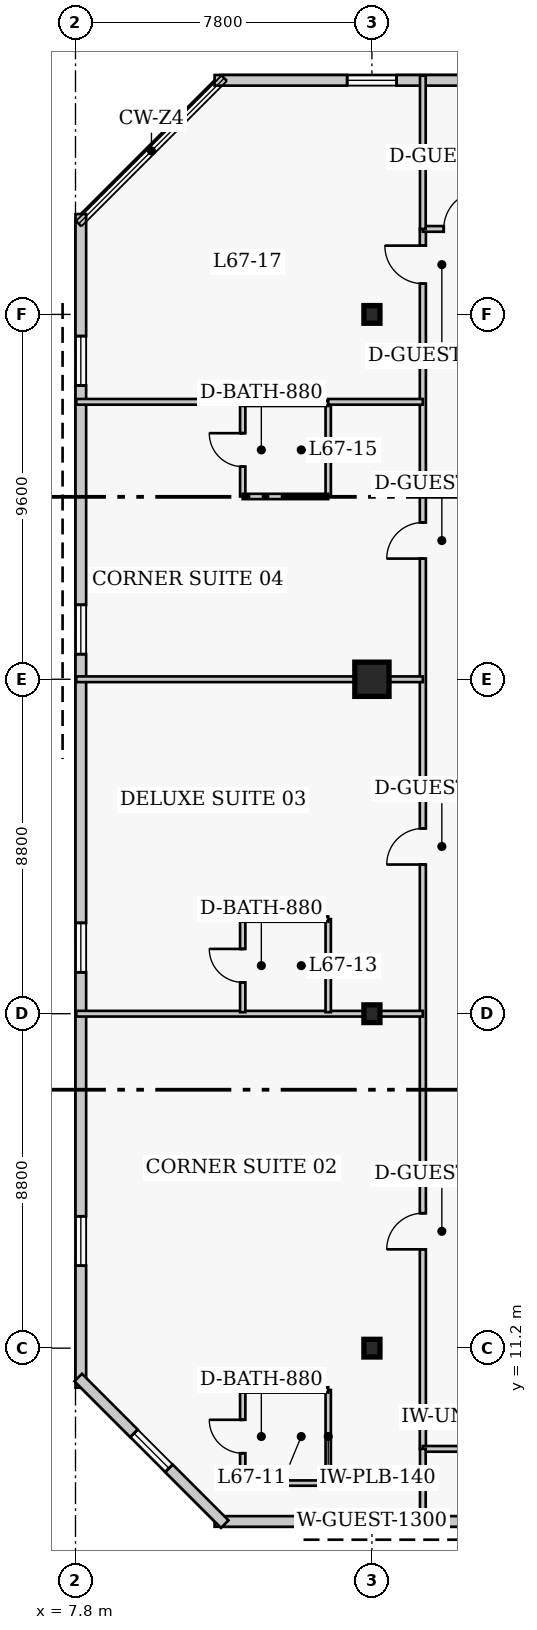
"""IFC4 building model, lengths in metres.
Left out: names, types, materials, properties, quantities, classifications, styles, units other than length and angle.
Written with IfcOpenShell. Run it as: python <this file> out.ifc"""

import sys

from ifc_helpers import new_model, si_unit, direction, frame, frame_2d, origin, origin_2d, place, context, subcontext, project, spatial, rectangle, i_section, extrude, element, fill, save


model = new_model("IFC4")
c1 = context("Model", 3, precision=1e-05, world=origin(), true_north=direction((0.0, 1.0)))
c2 = subcontext(c1, "Body", "Model", "MODEL_VIEW")
j1 = project(units=[si_unit("LENGTHUNIT", "METRE"), si_unit("PLANEANGLEUNIT", "RADIAN")], contexts=[c1])
p1 = place(None, origin())
s1 = spatial("IfcSite", under=j1, at=p1, CompositionType="ELEMENT")
p2 = place(p1, origin())
s2 = spatial("IfcBuilding", under=s1, at=p2, CompositionType="ELEMENT")
p3 = place(p2, frame((0.0, 0.0, 269.4)))
s3 = spatial("IfcBuildingStorey", under=s2, at=p3, CompositionType="ELEMENT", Elevation=269.4)
for number, where, z_axis, x_axis in (
    (1, (15.6, 11.2, 0.0), (0.0, 0.0, 1.0), (1.0, 0.0, 0.0)),
    (2, (15.6, 20.0, 0.0), (0.0, 0.0, 1.0), (1.0, 0.0, 0.0)),
):
    element("IfcColumn", number, at=place(p3, frame(where, z_axis=z_axis, x_axis=x_axis)), inside=s3, PredefinedType="COLUMN", context=c2, shape_type="SweptSolid", body=[
        extrude(i_section(OverallWidth=0.422, OverallDepth=0.465, WebThickness=0.045, FlangeThickness=0.073, FilletRadius=0.017, at=origin_2d()), origin(), (0.0, 0.0, 1.0), 4.0),
    ])
p4 = place(p3, frame((15.6, 28.8, 0.0), z_axis=(0.0, 0.0, 1.0), x_axis=(1.0, 0.0, 0.0)))
e3 = element("IfcColumn", 3, at=p4, inside=s3, PredefinedType="COLUMN", context=c2, shape_type="SweptSolid", body=[
    extrude(rectangle(XDim=0.9, YDim=0.9, at=origin_2d()), origin(), (0.0, 0.0, 1.0), 4.0),
])
p5 = place(p3, frame((15.6, 38.4, 0.0), z_axis=(0.0, 0.0, 1.0), x_axis=(1.0, 0.0, 0.0)))
e4 = element("IfcColumn", 4, at=p5, inside=s3, PredefinedType="COLUMN", context=c2, shape_type="SweptSolid", body=[
    extrude(i_section(OverallWidth=0.422, OverallDepth=0.465, WebThickness=0.045, FlangeThickness=0.073, FilletRadius=0.017, at=origin_2d()), origin(), (0.0, 0.0, 1.0), 4.0),
])
p6 = place(p3, frame((11.46, 6.64, 0.0), z_axis=(0.0, 0.0, 1.0), x_axis=(1.0, 0.0, 0.0)))
e5 = element("IfcWall", 5, at=p6, inside=s3, PredefinedType="SOLIDWALL", context=c2, shape_type="SweptSolid", body=[
    extrude(rectangle(XDim=24.83, YDim=0.28, at=frame_2d((12.415, 0.0))), origin(), (0.0, 0.0, 1.0), 3.76),
])
p7 = place(p6, frame((3.488, 0.0, 0.85)))
e6 = element("IfcOpeningElement", 6, at=p7, cuts=e5, PredefinedType="OPENING", context=c2, shape_type="SweptSolid", body=[
    extrude(rectangle(XDim=1.3, YDim=1.7, at=frame_2d((0.65, 0.85))), frame((0.0, 0.15, 0.0), z_axis=(0.0, -1.0, 0.0), x_axis=(1.0, 0.0, 0.0)), (0.0, 0.0, 1.0), 0.3),
])
p8 = place(p6, frame((12.915, 0.0, 0.85)))
e7 = element("IfcOpeningElement", 7, at=p8, cuts=e5, PredefinedType="OPENING", context=c2, shape_type="SweptSolid", body=[
    extrude(rectangle(XDim=1.3, YDim=1.7, at=frame_2d((0.65, 0.85))), frame((0.0, 0.15, 0.0), z_axis=(0.0, -1.0, 0.0), x_axis=(1.0, 0.0, 0.0)), (0.0, 0.0, 1.0), 0.3),
])
p9 = place(p6, frame((20.692, 0.0, 0.85)))
e8 = element("IfcOpeningElement", 8, at=p9, cuts=e5, PredefinedType="OPENING", context=c2, shape_type="SweptSolid", body=[
    extrude(rectangle(XDim=1.3, YDim=1.7, at=frame_2d((0.65, 0.85))), frame((0.0, 0.15, 0.0), z_axis=(0.0, -1.0, 0.0), x_axis=(1.0, 0.0, 0.0)), (0.0, 0.0, 1.0), 0.3),
])
p10 = place(p3, frame((36.29, 44.56, 0.0), z_axis=(0.0, 0.0, 1.0), x_axis=(-1.0, 0.0, 0.0)))
e9 = element("IfcWall", 9, at=p10, inside=s3, PredefinedType="SOLIDWALL", context=c2, shape_type="SweptSolid", body=[
    extrude(rectangle(XDim=24.83, YDim=0.28, at=frame_2d((12.415, 0.0))), origin(), (0.0, 0.0, 1.0), 3.76),
])
p11 = place(p10, frame((3.488, 0.0, 0.85)))
e10 = element("IfcOpeningElement", 10, at=p11, cuts=e9, PredefinedType="OPENING", context=c2, shape_type="SweptSolid", body=[
    extrude(rectangle(XDim=1.3, YDim=1.7, at=frame_2d((0.65, 0.85))), frame((0.0, 0.15, 0.0), z_axis=(0.0, -1.0, 0.0), x_axis=(1.0, 0.0, 0.0)), (0.0, 0.0, 1.0), 0.3),
])
p12 = place(p10, frame((11.765, 0.0, 0.85)))
e11 = element("IfcOpeningElement", 11, at=p12, cuts=e9, PredefinedType="OPENING", context=c2, shape_type="SweptSolid", body=[
    extrude(rectangle(XDim=1.3, YDim=1.7, at=frame_2d((0.65, 0.85))), frame((0.0, 0.15, 0.0), z_axis=(0.0, -1.0, 0.0), x_axis=(1.0, 0.0, 0.0)), (0.0, 0.0, 1.0), 0.3),
])
p13 = place(p10, frame((20.042, 0.0, 0.85)))
e12 = element("IfcOpeningElement", 12, at=p13, cuts=e9, PredefinedType="OPENING", context=c2, shape_type="SweptSolid", body=[
    extrude(rectangle(XDim=1.3, YDim=1.7, at=frame_2d((0.65, 0.85))), frame((0.0, 0.15, 0.0), z_axis=(0.0, -1.0, 0.0), x_axis=(1.0, 0.0, 0.0)), (0.0, 0.0, 1.0), 0.3),
])
p14 = place(p3, frame((7.94, 41.04, 0.0), z_axis=(0.0, 0.0, 1.0), x_axis=(0.0, -1.0, 0.0)))
e13 = element("IfcWall", 13, at=p14, inside=s3, PredefinedType="SOLIDWALL", context=c2, shape_type="SweptSolid", body=[
    extrude(rectangle(XDim=30.88, YDim=0.28, at=frame_2d((15.44, 0.0))), origin(), (0.0, 0.0, 1.0), 3.76),
])
p15 = place(p14, frame((3.21, 0.0, 0.85)))
e14 = element("IfcOpeningElement", 14, at=p15, cuts=e13, PredefinedType="OPENING", context=c2, shape_type="SweptSolid", body=[
    extrude(rectangle(XDim=1.3, YDim=1.7, at=frame_2d((0.65, 0.85))), frame((0.0, 0.15, 0.0), z_axis=(0.0, -1.0, 0.0), x_axis=(1.0, 0.0, 0.0)), (0.0, 0.0, 1.0), 0.3),
])
p16 = place(p14, frame((10.28, 0.0, 0.85)))
e15 = element("IfcOpeningElement", 15, at=p16, cuts=e13, PredefinedType="OPENING", context=c2, shape_type="SweptSolid", body=[
    extrude(rectangle(XDim=1.3, YDim=1.7, at=frame_2d((0.65, 0.85))), frame((0.0, 0.15, 0.0), z_axis=(0.0, -1.0, 0.0), x_axis=(1.0, 0.0, 0.0)), (0.0, 0.0, 1.0), 0.3),
])
p17 = place(p14, frame((18.65, 0.0, 0.85)))
e16 = element("IfcOpeningElement", 16, at=p17, cuts=e13, PredefinedType="OPENING", context=c2, shape_type="SweptSolid", body=[
    extrude(rectangle(XDim=1.3, YDim=1.7, at=frame_2d((0.65, 0.85))), frame((0.0, 0.15, 0.0), z_axis=(0.0, -1.0, 0.0), x_axis=(1.0, 0.0, 0.0)), (0.0, 0.0, 1.0), 0.3),
])
p18 = place(p14, frame((26.37, 0.0, 0.85)))
e17 = element("IfcOpeningElement", 17, at=p18, cuts=e13, PredefinedType="OPENING", context=c2, shape_type="SweptSolid", body=[
    extrude(rectangle(XDim=1.3, YDim=1.7, at=frame_2d((0.65, 0.85))), frame((0.0, 0.15, 0.0), z_axis=(0.0, -1.0, 0.0), x_axis=(1.0, 0.0, 0.0)), (0.0, 0.0, 1.0), 0.3),
])
p19 = place(p3, frame((7.871, 10.427, 0.0), z_axis=(0.0, 0.0, 1.0), x_axis=(0.707129162587, -0.707084399077, 0.0)))
e18 = element("IfcWall", 18, at=p19, inside=s3, PredefinedType="SOLIDWALL", context=c2, shape_type="SweptSolid", body=[
    extrude(rectangle(XDim=5.454, YDim=0.28, at=frame_2d((2.727, 0.0))), origin(), (0.0, 0.0, 1.0), 3.76),
])
p20 = place(p19, frame((2.077, 0.0, 0.85)))
e19 = element("IfcOpeningElement", 19, at=p20, cuts=e18, PredefinedType="OPENING", context=c2, shape_type="SweptSolid", body=[
    extrude(rectangle(XDim=1.3, YDim=1.7, at=frame_2d((0.65, 0.85))), frame((0.0, 0.15, 0.0), z_axis=(0.0, -1.0, 0.0), x_axis=(1.0, 0.0, 0.0)), (0.0, 0.0, 1.0), 0.3),
])
p21 = place(p3, frame((16.94, 8.55, 0.0), z_axis=(0.0, 0.0, 1.0), x_axis=(0.0, 1.0, 0.0)))
e20 = element("IfcWall", 20, at=p21, inside=s3, PredefinedType="PARTITIONING", context=c2, shape_type="SweptSolid", body=[
    extrude(rectangle(XDim=32.1, YDim=0.16, at=frame_2d((16.05, 0.0))), origin(), (0.0, 0.0, 1.0), 3.76),
])
p22 = place(p21, frame((5.25, 0.0, 0.0)))
e21 = element("IfcOpeningElement", 21, at=p22, cuts=e20, PredefinedType="OPENING", context=c2, shape_type="SweptSolid", body=[
    extrude(rectangle(XDim=0.95, YDim=2.1, at=frame_2d((0.475, 1.05))), frame((0.0, 0.09, 0.0), z_axis=(0.0, -1.0, 0.0), x_axis=(1.0, 0.0, 0.0)), (0.0, 0.0, 1.0), 0.18),
])
p23 = place(p21, frame((15.375, 0.0, 0.0)))
e22 = element("IfcOpeningElement", 22, at=p23, cuts=e20, PredefinedType="OPENING", context=c2, shape_type="SweptSolid", body=[
    extrude(rectangle(XDim=0.95, YDim=2.1, at=frame_2d((0.475, 1.05))), frame((0.0, 0.09, 0.0), z_axis=(0.0, -1.0, 0.0), x_axis=(1.0, 0.0, 0.0)), (0.0, 0.0, 1.0), 0.18),
])
p24 = place(p21, frame((23.425, 0.0, 0.0)))
e23 = element("IfcOpeningElement", 23, at=p24, cuts=e20, PredefinedType="OPENING", context=c2, shape_type="SweptSolid", body=[
    extrude(rectangle(XDim=0.95, YDim=2.1, at=frame_2d((0.475, 1.05))), frame((0.0, 0.09, 0.0), z_axis=(0.0, -1.0, 0.0), x_axis=(1.0, 0.0, 0.0)), (0.0, 0.0, 1.0), 0.18),
])
p25 = place(p21, frame((30.66, 0.0, 0.0)))
e24 = element("IfcOpeningElement", 24, at=p25, cuts=e20, PredefinedType="OPENING", context=c2, shape_type="SweptSolid", body=[
    extrude(rectangle(XDim=1.0, YDim=2.15, at=frame_2d((0.5, 1.075))), frame((0.0, 0.09, 0.0), z_axis=(0.0, -1.0, 0.0), x_axis=(1.0, 0.0, 0.0)), (0.0, 0.0, 1.0), 0.18),
])
p26 = place(p3, frame((16.94, 8.55, 0.0), z_axis=(0.0, 0.0, 1.0), x_axis=(1.0, 0.0, 0.0)))
e25 = element("IfcWall", 25, at=p26, inside=s3, PredefinedType="PARTITIONING", context=c2, shape_type="SweptSolid", body=[
    extrude(rectangle(XDim=2.22, YDim=0.15, at=frame_2d((1.11, 0.0))), origin(), (0.0, 0.0, 1.0), 3.76),
])
p27 = place(p3, frame((16.94, 40.65, 0.0), z_axis=(0.0, 0.0, 1.0), x_axis=(1.0, 0.0, 0.0)))
e26 = element("IfcWall", 26, at=p27, inside=s3, PredefinedType="PARTITIONING", context=c2, shape_type="SweptSolid", body=[
    extrude(rectangle(XDim=5.16, YDim=0.15, at=frame_2d((2.58, 0.0))), origin(), (0.0, 0.0, 1.0), 3.76),
])
p28 = place(p27, frame((0.55, 0.0, 0.0)))
e27 = element("IfcOpeningElement", 27, at=p28, cuts=e26, PredefinedType="OPENING", context=c2, shape_type="SweptSolid", body=[
    extrude(rectangle(XDim=1.0, YDim=2.15, at=frame_2d((0.5, 1.075))), frame((0.0, 0.085, 0.0), z_axis=(0.0, -1.0, 0.0), x_axis=(1.0, 0.0, 0.0)), (0.0, 0.0, 1.0), 0.17),
])
p29 = place(p3, frame((16.94, 40.65, 0.0), z_axis=(0.0, 0.0, 1.0), x_axis=(0.0, 1.0, 0.0)))
e28 = element("IfcWall", 28, at=p29, inside=s3, PredefinedType="PARTITIONING", context=c2, shape_type="SweptSolid", body=[
    extrude(rectangle(XDim=4.03, YDim=0.15, at=frame_2d((2.015, 0.0))), origin(), (0.0, 0.0, 1.0), 3.76),
])
p30 = place(p3, frame((16.94, 6.52, 0.0), z_axis=(0.0, 0.0, 1.0), x_axis=(0.0, 1.0, 0.0)))
e29 = element("IfcWall", 29, at=p30, inside=s3, PredefinedType="PARTITIONING", context=c2, shape_type="SweptSolid", body=[
    extrude(rectangle(XDim=2.03, YDim=0.15, at=frame_2d((1.015, 0.0))), origin(), (0.0, 0.0, 1.0), 3.76),
])
p31 = place(p3, frame((12.2, 7.65, 0.0), z_axis=(0.0, 0.0, 1.0), x_axis=(0.0, 1.0, 0.0)))
e30 = element("IfcWall", 30, at=p31, inside=s3, PredefinedType="PLUMBINGWALL", context=c2, shape_type="SweptSolid", body=[
    extrude(rectangle(XDim=2.45, YDim=0.14, at=frame_2d((1.225, 0.0))), origin(), (0.0, 0.0, 1.0), 3.76),
])
p32 = place(p31, frame((0.785, 0.0, 0.0)))
e31 = element("IfcOpeningElement", 31, at=p32, cuts=e30, PredefinedType="OPENING", context=c2, shape_type="SweptSolid", body=[
    extrude(rectangle(XDim=0.88, YDim=2.05, at=frame_2d((0.44, 1.025))), frame((0.0, 0.08, 0.0), z_axis=(0.0, -1.0, 0.0), x_axis=(1.0, 0.0, 0.0)), (0.0, 0.0, 1.0), 0.16),
])
p33 = place(p3, frame((14.45, 7.65, 0.0), z_axis=(0.0, 0.0, 1.0), x_axis=(0.0, 1.0, 0.0)))
e32 = element("IfcWall", 32, at=p33, inside=s3, PredefinedType="PLUMBINGWALL", context=c2, shape_type="SweptSolid", body=[
    extrude(rectangle(XDim=2.45, YDim=0.14, at=frame_2d((1.225, 0.0))), origin(), (0.0, 0.0, 1.0), 3.76),
])
for number, where, z_axis, x_axis in (
    (33, (12.2, 7.65, 0.0), (0.0, 0.0, 1.0), (1.0, 0.0, 0.0)),
    (34, (12.2, 10.1, 0.0), (0.0, 0.0, 1.0), (1.0, 0.0, 0.0)),
):
    element("IfcWall", number, at=place(p3, frame(where, z_axis=z_axis, x_axis=x_axis)), inside=s3, PredefinedType="PLUMBINGWALL", context=c2, shape_type="SweptSolid", body=[
        extrude(rectangle(XDim=2.25, YDim=0.14, at=frame_2d((1.125, 0.0))), origin(), (0.0, 0.0, 1.0), 3.76),
    ])
p34 = place(p3, frame((7.82, 20.0, 0.0), z_axis=(0.0, 0.0, 1.0), x_axis=(1.0, 0.0, 0.0)))
e35 = element("IfcWall", 35, at=p34, inside=s3, PredefinedType="PARTITIONING", context=c2, shape_type="SweptSolid", body=[
    extrude(rectangle(XDim=9.12, YDim=0.15, at=frame_2d((4.56, 0.0))), origin(), (0.0, 0.0, 1.0), 3.064),
])
p35 = place(p3, frame((12.2, 20.04, 0.0), z_axis=(0.0, 0.0, 1.0), x_axis=(0.0, 1.0, 0.0)))
e36 = element("IfcWall", 36, at=p35, inside=s3, PredefinedType="PLUMBINGWALL", context=c2, shape_type="SweptSolid", body=[
    extrude(rectangle(XDim=2.45, YDim=0.14, at=frame_2d((1.225, 0.0))), origin(), (0.0, 0.0, 1.0), 3.76),
])
p36 = place(p35, frame((0.785, 0.0, 0.0)))
e37 = element("IfcOpeningElement", 37, at=p36, cuts=e36, PredefinedType="OPENING", context=c2, shape_type="SweptSolid", body=[
    extrude(rectangle(XDim=0.88, YDim=2.05, at=frame_2d((0.44, 1.025))), frame((0.0, 0.08, 0.0), z_axis=(0.0, -1.0, 0.0), x_axis=(1.0, 0.0, 0.0)), (0.0, 0.0, 1.0), 0.16),
])
p37 = place(p3, frame((14.45, 20.04, 0.0), z_axis=(0.0, 0.0, 1.0), x_axis=(0.0, 1.0, 0.0)))
e38 = element("IfcWall", 38, at=p37, inside=s3, PredefinedType="PLUMBINGWALL", context=c2, shape_type="SweptSolid", body=[
    extrude(rectangle(XDim=2.45, YDim=0.14, at=frame_2d((1.225, 0.0))), origin(), (0.0, 0.0, 1.0), 3.76),
])
p38 = place(p3, frame((12.2, 22.49, 0.0), z_axis=(0.0, 0.0, 1.0), x_axis=(1.0, 0.0, 0.0)))
e39 = element("IfcWall", 39, at=p38, inside=s3, PredefinedType="PLUMBINGWALL", context=c2, shape_type="SweptSolid", body=[
    extrude(rectangle(XDim=2.25, YDim=0.14, at=frame_2d((1.125, 0.0))), origin(), (0.0, 0.0, 1.0), 3.76),
])
p39 = place(p3, frame((7.82, 28.8, 0.0), z_axis=(0.0, 0.0, 1.0), x_axis=(1.0, 0.0, 0.0)))
e40 = element("IfcWall", 40, at=p39, inside=s3, PredefinedType="PARTITIONING", context=c2, shape_type="SweptSolid", body=[
    extrude(rectangle(XDim=9.12, YDim=0.15, at=frame_2d((4.56, 0.0))), origin(), (0.0, 0.0, 1.0), 3.064),
])
p40 = place(p3, frame((12.2, 33.61, 0.0), z_axis=(0.0, 0.0, 1.0), x_axis=(0.0, 1.0, 0.0)))
e41 = element("IfcWall", 41, at=p40, inside=s3, PredefinedType="PLUMBINGWALL", context=c2, shape_type="SweptSolid", body=[
    extrude(rectangle(XDim=2.45, YDim=0.14, at=frame_2d((1.225, 0.0))), origin(), (0.0, 0.0, 1.0), 3.76),
])
p41 = place(p40, frame((0.785, 0.0, 0.0)))
e42 = element("IfcOpeningElement", 42, at=p41, cuts=e41, PredefinedType="OPENING", context=c2, shape_type="SweptSolid", body=[
    extrude(rectangle(XDim=0.88, YDim=2.05, at=frame_2d((0.44, 1.025))), frame((0.0, 0.08, 0.0), z_axis=(0.0, -1.0, 0.0), x_axis=(1.0, 0.0, 0.0)), (0.0, 0.0, 1.0), 0.16),
])
p42 = place(p3, frame((14.45, 33.61, 0.0), z_axis=(0.0, 0.0, 1.0), x_axis=(0.0, 1.0, 0.0)))
e43 = element("IfcWall", 43, at=p42, inside=s3, PredefinedType="PLUMBINGWALL", context=c2, shape_type="SweptSolid", body=[
    extrude(rectangle(XDim=2.45, YDim=0.14, at=frame_2d((1.225, 0.0))), origin(), (0.0, 0.0, 1.0), 3.76),
])
for number, where, z_axis, x_axis in (
    (44, (12.2, 33.61, 0.0), (0.0, 0.0, 1.0), (1.0, 0.0, 0.0)),
    (45, (12.2, 36.06, 0.0), (0.0, 0.0, 1.0), (1.0, 0.0, 0.0)),
):
    element("IfcWall", number, at=place(p3, frame(where, z_axis=z_axis, x_axis=x_axis)), inside=s3, PredefinedType="PLUMBINGWALL", context=c2, shape_type="SweptSolid", body=[
        extrude(rectangle(XDim=2.25, YDim=0.14, at=frame_2d((1.125, 0.0))), origin(), (0.0, 0.0, 1.0), 3.76),
    ])
p43 = place(p3, frame((7.82, 36.1, 0.0), z_axis=(0.0, 0.0, 1.0), x_axis=(1.0, 0.0, 0.0)))
e46 = element("IfcWall", 46, at=p43, inside=s3, PredefinedType="PARTITIONING", context=c2, shape_type="SweptSolid", body=[
    extrude(rectangle(XDim=4.38, YDim=0.15, at=frame_2d((2.19, 0.0))), origin(), (0.0, 0.0, 1.0), 3.76),
])
p44 = place(p3, frame((14.45, 36.1, 0.0), z_axis=(0.0, 0.0, 1.0), x_axis=(1.0, 0.0, 0.0)))
e47 = element("IfcWall", 47, at=p44, inside=s3, PredefinedType="PARTITIONING", context=c2, shape_type="SweptSolid", body=[
    extrude(rectangle(XDim=2.49, YDim=0.15, at=frame_2d((1.245, 0.0))), origin(), (0.0, 0.0, 1.0), 3.76),
])
p45 = place(p7, origin())
e48 = element("IfcWindow", 48, at=p45, inside=s3, PartitioningType="SINGLE_PANEL", PredefinedType="WINDOW", context=c2, shape_type="SweptSolid", body=[
    extrude(rectangle(XDim=1.3, YDim=1.7, at=frame_2d((0.65, 0.85))), frame((0.0, 0.03, 0.0), z_axis=(0.0, -1.0, 0.0), x_axis=(1.0, 0.0, 0.0)), (0.0, 0.0, 1.0), 0.06),
])
fill(e6, e48)
p46 = place(p13, origin())
e49 = element("IfcWindow", 49, at=p46, inside=s3, PartitioningType="SINGLE_PANEL", PredefinedType="WINDOW", context=c2, shape_type="SweptSolid", body=[
    extrude(rectangle(XDim=1.3, YDim=1.7, at=frame_2d((0.65, 0.85))), frame((0.0, 0.03, 0.0), z_axis=(0.0, -1.0, 0.0), x_axis=(1.0, 0.0, 0.0)), (0.0, 0.0, 1.0), 0.06),
])
fill(e12, e49)
p47 = place(p15, origin())
e50 = element("IfcWindow", 50, at=p47, inside=s3, PartitioningType="SINGLE_PANEL", PredefinedType="WINDOW", context=c2, shape_type="SweptSolid", body=[
    extrude(rectangle(XDim=1.3, YDim=1.7, at=frame_2d((0.65, 0.85))), frame((0.0, 0.03, 0.0), z_axis=(0.0, -1.0, 0.0), x_axis=(1.0, 0.0, 0.0)), (0.0, 0.0, 1.0), 0.06),
])
fill(e14, e50)
p48 = place(p16, origin())
e51 = element("IfcWindow", 51, at=p48, inside=s3, PartitioningType="SINGLE_PANEL", PredefinedType="WINDOW", context=c2, shape_type="SweptSolid", body=[
    extrude(rectangle(XDim=1.3, YDim=1.7, at=frame_2d((0.65, 0.85))), frame((0.0, 0.03, 0.0), z_axis=(0.0, -1.0, 0.0), x_axis=(1.0, 0.0, 0.0)), (0.0, 0.0, 1.0), 0.06),
])
fill(e15, e51)
p49 = place(p17, origin())
e52 = element("IfcWindow", 52, at=p49, inside=s3, PartitioningType="SINGLE_PANEL", PredefinedType="WINDOW", context=c2, shape_type="SweptSolid", body=[
    extrude(rectangle(XDim=1.3, YDim=1.7, at=frame_2d((0.65, 0.85))), frame((0.0, 0.03, 0.0), z_axis=(0.0, -1.0, 0.0), x_axis=(1.0, 0.0, 0.0)), (0.0, 0.0, 1.0), 0.06),
])
fill(e16, e52)
p50 = place(p18, origin())
e53 = element("IfcWindow", 53, at=p50, inside=s3, PartitioningType="SINGLE_PANEL", PredefinedType="WINDOW", context=c2, shape_type="SweptSolid", body=[
    extrude(rectangle(XDim=1.3, YDim=1.7, at=frame_2d((0.65, 0.85))), frame((0.0, 0.03, 0.0), z_axis=(0.0, -1.0, 0.0), x_axis=(1.0, 0.0, 0.0)), (0.0, 0.0, 1.0), 0.06),
])
fill(e17, e53)
p51 = place(p20, origin())
e54 = element("IfcWindow", 54, at=p51, inside=s3, PartitioningType="SINGLE_PANEL", PredefinedType="WINDOW", context=c2, shape_type="SweptSolid", body=[
    extrude(rectangle(XDim=1.3, YDim=1.7, at=frame_2d((0.65, 0.85))), frame((0.0, 0.03, 0.0), z_axis=(0.0, -1.0, 0.0), x_axis=(1.0, 0.0, 0.0)), (0.0, 0.0, 1.0), 0.06),
])
fill(e19, e54)
p52 = place(p28, origin())
e55 = element("IfcDoor", 55, at=p52, inside=s3, OperationType="SINGLE_SWING_RIGHT", PredefinedType="DOOR", context=c2, shape_type="SweptSolid", body=[
    extrude(rectangle(XDim=1.0, YDim=2.15, at=frame_2d((0.5, 1.075))), frame((0.0, 0.025, 0.0), z_axis=(0.0, -1.0, 0.0), x_axis=(1.0, 0.0, 0.0)), (0.0, 0.0, 1.0), 0.05),
])
fill(e27, e55)
p53 = place(p32, origin())
e56 = element("IfcDoor", 56, at=p53, inside=s3, OperationType="SINGLE_SWING_RIGHT", PredefinedType="DOOR", context=c2, shape_type="SweptSolid", body=[
    extrude(rectangle(XDim=0.88, YDim=2.05, at=frame_2d((0.44, 1.025))), frame((0.0, 0.025, 0.0), z_axis=(0.0, -1.0, 0.0), x_axis=(1.0, 0.0, 0.0)), (0.0, 0.0, 1.0), 0.05),
])
fill(e31, e56)
p54 = place(p22, origin())
e57 = element("IfcDoor", 57, at=p54, inside=s3, OperationType="SINGLE_SWING_LEFT", PredefinedType="DOOR", context=c2, shape_type="SweptSolid", body=[
    extrude(rectangle(XDim=0.95, YDim=2.1, at=frame_2d((0.475, 1.05))), frame((0.0, 0.025, 0.0), z_axis=(0.0, -1.0, 0.0), x_axis=(1.0, 0.0, 0.0)), (0.0, 0.0, 1.0), 0.05),
])
fill(e21, e57)
p55 = place(p36, origin())
e58 = element("IfcDoor", 58, at=p55, inside=s3, OperationType="SINGLE_SWING_RIGHT", PredefinedType="DOOR", context=c2, shape_type="SweptSolid", body=[
    extrude(rectangle(XDim=0.88, YDim=2.05, at=frame_2d((0.44, 1.025))), frame((0.0, 0.025, 0.0), z_axis=(0.0, -1.0, 0.0), x_axis=(1.0, 0.0, 0.0)), (0.0, 0.0, 1.0), 0.05),
])
fill(e37, e58)
p56 = place(p23, origin())
e59 = element("IfcDoor", 59, at=p56, inside=s3, OperationType="SINGLE_SWING_LEFT", PredefinedType="DOOR", context=c2, shape_type="SweptSolid", body=[
    extrude(rectangle(XDim=0.95, YDim=2.1, at=frame_2d((0.475, 1.05))), frame((0.0, 0.025, 0.0), z_axis=(0.0, -1.0, 0.0), x_axis=(1.0, 0.0, 0.0)), (0.0, 0.0, 1.0), 0.05),
])
fill(e22, e59)
p57 = place(p41, origin())
e60 = element("IfcDoor", 60, at=p57, inside=s3, OperationType="SINGLE_SWING_RIGHT", PredefinedType="DOOR", context=c2, shape_type="SweptSolid", body=[
    extrude(rectangle(XDim=0.88, YDim=2.05, at=frame_2d((0.44, 1.025))), frame((0.0, 0.025, 0.0), z_axis=(0.0, -1.0, 0.0), x_axis=(1.0, 0.0, 0.0)), (0.0, 0.0, 1.0), 0.05),
])
fill(e42, e60)
p58 = place(p24, origin())
e61 = element("IfcDoor", 61, at=p58, inside=s3, OperationType="SINGLE_SWING_LEFT", PredefinedType="DOOR", context=c2, shape_type="SweptSolid", body=[
    extrude(rectangle(XDim=0.95, YDim=2.1, at=frame_2d((0.475, 1.05))), frame((0.0, 0.025, 0.0), z_axis=(0.0, -1.0, 0.0), x_axis=(1.0, 0.0, 0.0)), (0.0, 0.0, 1.0), 0.05),
])
fill(e23, e61)
p59 = place(p25, origin())
e62 = element("IfcDoor", 62, at=p59, inside=s3, OperationType="SINGLE_SWING_RIGHT", PredefinedType="DOOR", context=c2, shape_type="SweptSolid", body=[
    extrude(rectangle(XDim=1.0, YDim=2.15, at=frame_2d((0.5, 1.075))), frame((0.0, 0.025, 0.0), z_axis=(0.0, -1.0, 0.0), x_axis=(1.0, 0.0, 0.0)), (0.0, 0.0, 1.0), 0.05),
])
fill(e24, e62)
save(model, sys.argv[1])
